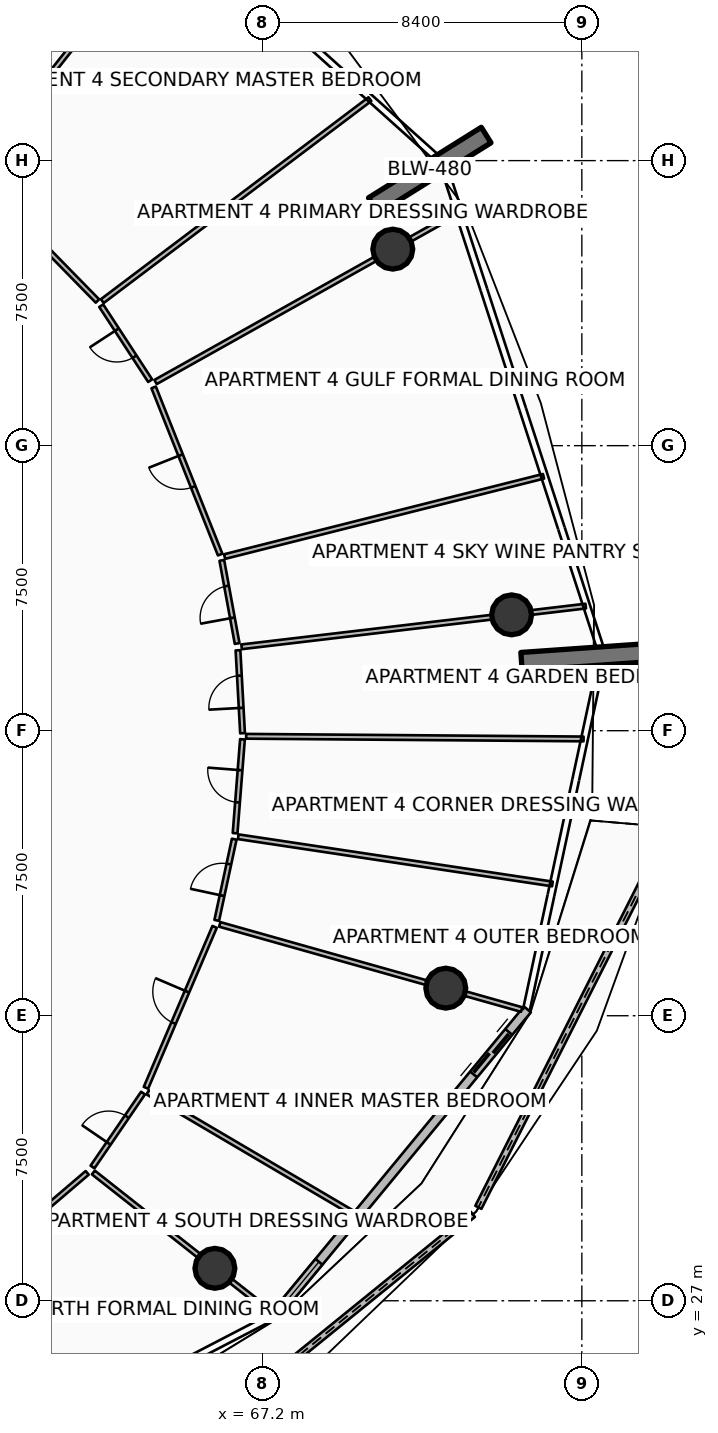
"""IFC4 building model, lengths in metres.
Left out: names, types, materials, properties, quantities, classifications, styles, units other than length and angle.
Written with IfcOpenShell. Run it as: python <this file> out.ifc"""

import sys

from ifc_helpers import new_model, si_unit, direction, frame, frame_2d, origin, origin_2d, place, context, subcontext, project, spatial, polyline, rectangle, circle, outline, extrude, element, fill, save


model = new_model("IFC4")
c1 = context("Model", 3, precision=1e-05, world=origin(), true_north=direction((0.0, 1.0)))
c2 = subcontext(c1, "Body", "Model", "MODEL_VIEW")
j1 = project(units=[si_unit("LENGTHUNIT", "METRE"), si_unit("PLANEANGLEUNIT", "RADIAN")], contexts=[c1])
p1 = place(None, origin())
s1 = spatial("IfcSite", under=j1, at=p1, CompositionType="ELEMENT")
p2 = place(p1, origin())
s2 = spatial("IfcBuilding", under=s1, at=p2, CompositionType="ELEMENT")
p3 = place(p2, frame((0.0, 0.0, 202.8)))
s3 = spatial("IfcBuildingStorey", under=s2, at=p3, CompositionType="ELEMENT", Elevation=202.8)
p4 = place(p3, frame((70.114, 55.818, 0.0), z_axis=(0.0, 0.0, 1.0), x_axis=(0.848033572426, 0.529942506352, 0.0)))
e1 = element("IfcWall", 1, at=p4, inside=s3, PredefinedType="SOLIDWALL", context=c2, shape_type="SweptSolid", body=[
    extrude(rectangle(XDim=3.5, YDim=0.48, at=frame_2d((1.75, 0.0))), origin(), (0.0, 0.0, 1.0), 3.75),
])
p5 = place(p3, frame((74.013, 43.819, 0.0), z_axis=(0.0, 0.0, 1.0), x_axis=(0.997568676264, 0.069690287244, 0.0)))
e2 = element("IfcWall", 2, at=p5, inside=s3, PredefinedType="SOLIDWALL", context=c2, shape_type="SweptSolid", body=[
    extrude(rectangle(XDim=3.5, YDim=0.48, at=frame_2d((1.75, 0.0))), origin(), (0.0, 0.0, 1.0), 3.75),
])
for number, where, z_axis, x_axis in (
    (3, (70.625, 54.671, 0.0), (0.0, 0.0, 1.0), (1.0, 0.0, 0.0)),
    (4, (65.944, 27.854, 0.0), (0.0, 0.0, 1.0), (1.0, 0.0, 0.0)),
    (5, (72.02, 35.226, 0.0), (0.0, 0.0, 1.0), (1.0, 0.0, 0.0)),
    (6, (73.752, 45.048, 0.0), (0.0, 0.0, 1.0), (1.0, 0.0, 0.0)),
):
    element("IfcColumn", number, at=place(p3, frame(where, z_axis=z_axis, x_axis=x_axis)), inside=s3, PredefinedType="COLUMN", context=c2, shape_type="SweptSolid", body=[
        extrude(circle(Radius=0.525, at=origin_2d()), origin(), (0.0, 0.0, 1.0), 3.5),
    ])
p6 = place(p3, frame((64.663, 22.729, 0.0), z_axis=(0.0, 0.0, 1.0), x_axis=(0.776456761235, 0.630170530834, 0.0)))
e7 = element("IfcWall", 7, at=p6, inside=s3, PredefinedType="PARAPET", context=c2, shape_type="SweptSolid", body=[
    extrude(outline(polyline([(0.0, 0.0), (10.389, 0.0), (10.389, 1.148), (5.195, 1.127), (0.0, 1.224), (0.0, 0.0)])), frame((0.0, 0.09, 0.0), z_axis=(0.0, -1.0, 0.0), x_axis=(1.0, 0.0, 0.0)), (0.0, 0.0, 1.0), 0.18),
])
p7 = place(p3, frame((72.877, 29.459, 0.0), z_axis=(0.0, 0.0, 1.0), x_axis=(0.451373731974, 0.892335001042, 0.0)))
e8 = element("IfcWall", 8, at=p7, inside=s3, PredefinedType="PARAPET", context=c2, shape_type="SweptSolid", body=[
    extrude(outline(polyline([(0.0, 0.0), (11.208, 0.0), (11.208, 1.483), (5.604, 1.284), (0.0, 1.148), (0.0, 0.0)])), frame((0.0, 0.09, 0.0), z_axis=(0.0, -1.0, 0.0), x_axis=(1.0, 0.0, 0.0)), (0.0, 0.0, 1.0), 0.18),
])
p8 = place(p3, frame((67.485, 26.576, 0.0), z_axis=(0.0, 0.0, 1.0), x_axis=(0.636759394418, 0.771062561418, 0.0)))
e9 = element("IfcWall", 9, at=p8, inside=s3, PredefinedType="SOLIDWALL", context=c2, shape_type="SweptSolid", body=[
    extrude(rectangle(XDim=10.494, YDim=0.24, at=frame_2d((5.247, 0.0))), origin(), (0.0, 0.0, 1.0), 2.45),
])
p9 = place(p8, frame((8.274, 0.0, 0.0)))
e10 = element("IfcOpeningElement", 10, at=p9, cuts=e9, PredefinedType="OPENING", context=c2, shape_type="SweptSolid", body=[
    extrude(rectangle(XDim=1.45, YDim=2.15, at=frame_2d((0.725, 1.075))), frame((0.0, 0.13, 0.0), z_axis=(0.0, -1.0, 0.0), x_axis=(1.0, 0.0, 0.0)), (0.0, 0.0, 1.0), 0.26),
])
p10 = place(p8, frame((0.28, 0.0, 0.65)))
e11 = element("IfcOpeningElement", 11, at=p10, cuts=e9, PredefinedType="OPENING", context=c2, shape_type="SweptSolid", body=[
    extrude(rectangle(XDim=1.6, YDim=1.5, at=frame_2d((0.8, 0.75))), frame((0.0, 0.13, 0.0), z_axis=(0.0, -1.0, 0.0), x_axis=(1.0, 0.0, 0.0)), (0.0, 0.0, 1.0), 0.26),
])
p11 = place(p3, frame((57.21, 25.776, 0.0), z_axis=(0.0, 0.0, 1.0), x_axis=(0.760406375863, 0.649447567973, 0.0)))
e12 = element("IfcWall", 12, at=p11, inside=s3, PredefinedType="PARTITIONING", context=c2, shape_type="SweptSolid", body=[
    extrude(rectangle(XDim=7.067, YDim=0.125, at=frame_2d((3.534, 0.0))), origin(), (0.0, 0.0, 1.0), 2.94),
])
p12 = place(p11, frame((3.084, 0.0, 0.0)))
e13 = element("IfcOpeningElement", 13, at=p12, cuts=e12, PredefinedType="OPENING", context=c2, shape_type="SweptSolid", body=[
    extrude(rectangle(XDim=0.9, YDim=2.08, at=frame_2d((0.45, 1.04))), frame((0.0, 0.073, 0.0), z_axis=(0.0, -1.0, 0.0), x_axis=(1.0, 0.0, 0.0)), (0.0, 0.0, 1.0), 0.145),
])
p13 = place(p3, frame((62.746, 30.375, 0.0), z_axis=(0.0, 0.0, 1.0), x_axis=(0.785328774221, -0.619078925809, 0.0)))
e14 = element("IfcWall", 14, at=p13, inside=s3, PredefinedType="PARTITIONING", context=c2, shape_type="SweptSolid", body=[
    extrude(rectangle(XDim=6.05, YDim=0.125, at=frame_2d((3.025, 0.0))), origin(), (0.0, 0.0, 1.0), 2.94),
])
p14 = place(p3, frame((64.176, 32.485, 0.0), z_axis=(0.0, 0.0, 1.0), x_axis=(0.861934215158, -0.507020126563, 0.0)))
e15 = element("IfcWall", 15, at=p14, inside=s3, PredefinedType="PARTITIONING", context=c2, shape_type="SweptSolid", body=[
    extrude(rectangle(XDim=6.269, YDim=0.125, at=frame_2d((3.135, 0.0))), origin(), (0.0, 0.0, 1.0), 2.94),
])
p15 = place(p3, frame((62.724, 30.52, 0.0), z_axis=(0.0, 0.0, 1.0), x_axis=(0.564301181705, 0.825569001554, 0.0)))
e16 = element("IfcWall", 16, at=p15, inside=s3, PredefinedType="PARTITIONING", context=c2, shape_type="SweptSolid", body=[
    extrude(rectangle(XDim=2.356, YDim=0.125, at=frame_2d((1.178, 0.0))), origin(), (0.0, 0.0, 1.0), 2.94),
])
p16 = place(p15, frame((0.753, 0.0, 0.0)))
e17 = element("IfcOpeningElement", 17, at=p16, cuts=e16, PredefinedType="OPENING", context=c2, shape_type="SweptSolid", body=[
    extrude(rectangle(XDim=0.85, YDim=2.06, at=frame_2d((0.425, 1.03))), frame((0.0, 0.073, 0.0), z_axis=(0.0, -1.0, 0.0), x_axis=(1.0, 0.0, 0.0)), (0.0, 0.0, 1.0), 0.145),
])
p17 = place(p3, frame((64.13, 32.604, 0.0), z_axis=(0.0, 0.0, 1.0), x_axis=(0.392433899516, 0.919780209893, 0.0)))
e18 = element("IfcWall", 18, at=p17, inside=s3, PredefinedType="PARTITIONING", context=c2, shape_type="SweptSolid", body=[
    extrude(rectangle(XDim=4.604, YDim=0.125, at=frame_2d((2.302, 0.0))), origin(), (0.0, 0.0, 1.0), 2.94),
])
p18 = place(p17, frame((1.852, 0.0, 0.0)))
e19 = element("IfcOpeningElement", 19, at=p18, cuts=e18, PredefinedType="OPENING", context=c2, shape_type="SweptSolid", body=[
    extrude(rectangle(XDim=0.9, YDim=2.08, at=frame_2d((0.45, 1.04))), frame((0.0, 0.073, 0.0), z_axis=(0.0, -1.0, 0.0), x_axis=(1.0, 0.0, 0.0)), (0.0, 0.0, 1.0), 0.145),
])
p19 = place(p3, frame((66.072, 36.903, 0.0), z_axis=(0.0, 0.0, 1.0), x_axis=(0.9624482888, -0.271465083179, 0.0)))
e20 = element("IfcWall", 20, at=p19, inside=s3, PredefinedType="PARTITIONING", context=c2, shape_type="SweptSolid", body=[
    extrude(rectangle(XDim=8.253, YDim=0.125, at=frame_2d((4.126, 0.0))), origin(), (0.0, 0.0, 1.0), 2.94),
])
p20 = place(p3, frame((66.558, 39.21, 0.0), z_axis=(0.0, 0.0, 1.0), x_axis=(0.988887463127, -0.148666019217, 0.0)))
e21 = element("IfcWall", 21, at=p20, inside=s3, PredefinedType="PARTITIONING", context=c2, shape_type="SweptSolid", body=[
    extrude(rectangle(XDim=8.361, YDim=0.125, at=frame_2d((4.18, 0.0))), origin(), (0.0, 0.0, 1.0), 2.94),
])
p21 = place(p3, frame((66.766, 41.853, 0.0), z_axis=(0.0, 0.0, 1.0), x_axis=(0.999969292204, -0.007836749939, 0.0)))
e22 = element("IfcWall", 22, at=p21, inside=s3, PredefinedType="PARTITIONING", context=c2, shape_type="SweptSolid", body=[
    extrude(rectangle(XDim=8.879, YDim=0.125, at=frame_2d((4.439, 0.0))), origin(), (0.0, 0.0, 1.0), 2.94),
])
p22 = place(p3, frame((65.993, 37.009, 0.0), z_axis=(0.0, 0.0, 1.0), x_axis=(0.210467381842, 0.977600880309, 0.0)))
e23 = element("IfcWall", 23, at=p22, inside=s3, PredefinedType="PARTITIONING", context=c2, shape_type="SweptSolid", body=[
    extrude(rectangle(XDim=2.186, YDim=0.125, at=frame_2d((1.093, 0.0))), origin(), (0.0, 0.0, 1.0), 2.94),
])
p23 = place(p22, frame((0.668, 0.0, 0.0)))
e24 = element("IfcOpeningElement", 24, at=p23, cuts=e23, PredefinedType="OPENING", context=c2, shape_type="SweptSolid", body=[
    extrude(rectangle(XDim=0.85, YDim=2.06, at=frame_2d((0.425, 1.03))), frame((0.0, 0.073, 0.0), z_axis=(0.0, -1.0, 0.0), x_axis=(1.0, 0.0, 0.0)), (0.0, 0.0, 1.0), 0.145),
])
p24 = place(p3, frame((66.476, 39.303, 0.0), z_axis=(0.0, 0.0, 1.0), x_axis=(0.078519549514, 0.996912574073, 0.0)))
e25 = element("IfcWall", 25, at=p24, inside=s3, PredefinedType="PARTITIONING", context=c2, shape_type="SweptSolid", body=[
    extrude(rectangle(XDim=2.478, YDim=0.125, at=frame_2d((1.239, 0.0))), origin(), (0.0, 0.0, 1.0), 2.94),
])
p25 = place(p24, frame((0.814, 0.0, 0.0)))
e26 = element("IfcOpeningElement", 26, at=p25, cuts=e25, PredefinedType="OPENING", context=c2, shape_type="SweptSolid", body=[
    extrude(rectangle(XDim=0.85, YDim=2.06, at=frame_2d((0.425, 1.03))), frame((0.0, 0.073, 0.0), z_axis=(0.0, -1.0, 0.0), x_axis=(1.0, 0.0, 0.0)), (0.0, 0.0, 1.0), 0.145),
])
p26 = place(p3, frame((66.672, 41.933, 0.0), z_axis=(0.0, 0.0, 1.0), x_axis=(-0.054962664786, 0.998488410288, 0.0)))
e27 = element("IfcWall", 27, at=p26, inside=s3, PredefinedType="PARTITIONING", context=c2, shape_type="SweptSolid", body=[
    extrude(rectangle(XDim=2.186, YDim=0.125, at=frame_2d((1.093, 0.0))), origin(), (0.0, 0.0, 1.0), 2.94),
])
p27 = place(p26, frame((0.668, 0.0, 0.0)))
e28 = element("IfcOpeningElement", 28, at=p27, cuts=e27, PredefinedType="OPENING", context=c2, shape_type="SweptSolid", body=[
    extrude(rectangle(XDim=0.85, YDim=2.06, at=frame_2d((0.425, 1.03))), frame((0.0, 0.073, 0.0), z_axis=(0.0, -1.0, 0.0), x_axis=(1.0, 0.0, 0.0)), (0.0, 0.0, 1.0), 0.145),
])
p28 = place(p3, frame((66.647, 44.207, 0.0), z_axis=(0.0, 0.0, 1.0), x_axis=(0.993068115644, 0.117540281145, 0.0)))
e29 = element("IfcWall", 29, at=p28, inside=s3, PredefinedType="PARTITIONING", context=c2, shape_type="SweptSolid", body=[
    extrude(rectangle(XDim=9.118, YDim=0.125, at=frame_2d((4.559, 0.0))), origin(), (0.0, 0.0, 1.0), 2.94),
])
p29 = place(p3, frame((66.199, 46.582, 0.0), z_axis=(0.0, 0.0, 1.0), x_axis=(0.969747932206, 0.244108475851, 0.0)))
e30 = element("IfcWall", 30, at=p29, inside=s3, PredefinedType="PARTITIONING", context=c2, shape_type="SweptSolid", body=[
    extrude(rectangle(XDim=8.654, YDim=0.125, at=frame_2d((4.327, 0.0))), origin(), (0.0, 0.0, 1.0), 2.94),
])
p30 = place(p3, frame((66.529, 44.293, 0.0), z_axis=(0.0, 0.0, 1.0), x_axis=(-0.181126107814, 0.983459878728, 0.0)))
e31 = element("IfcWall", 31, at=p30, inside=s3, PredefinedType="PARTITIONING", context=c2, shape_type="SweptSolid", body=[
    extrude(rectangle(XDim=2.224, YDim=0.125, at=frame_2d((1.112, 0.0))), origin(), (0.0, 0.0, 1.0), 2.94),
])
p31 = place(p30, frame((0.687, 0.0, 0.0)))
e32 = element("IfcOpeningElement", 32, at=p31, cuts=e31, PredefinedType="OPENING", context=c2, shape_type="SweptSolid", body=[
    extrude(rectangle(XDim=0.85, YDim=2.06, at=frame_2d((0.425, 1.03))), frame((0.0, 0.073, 0.0), z_axis=(0.0, -1.0, 0.0), x_axis=(1.0, 0.0, 0.0)), (0.0, 0.0, 1.0), 0.145),
])
p32 = place(p3, frame((66.082, 46.634, 0.0), z_axis=(0.0, 0.0, 1.0), x_axis=(-0.369567399645, 0.929203926552, 0.0)))
e33 = element("IfcWall", 33, at=p32, inside=s3, PredefinedType="PARTITIONING", context=c2, shape_type="SweptSolid", body=[
    extrude(rectangle(XDim=4.735, YDim=0.125, at=frame_2d((2.367, 0.0))), origin(), (0.0, 0.0, 1.0), 2.94),
])
p33 = place(p32, frame((1.917, 0.0, 0.0)))
e34 = element("IfcOpeningElement", 34, at=p33, cuts=e33, PredefinedType="OPENING", context=c2, shape_type="SweptSolid", body=[
    extrude(rectangle(XDim=0.9, YDim=2.08, at=frame_2d((0.45, 1.04))), frame((0.0, 0.073, 0.0), z_axis=(0.0, -1.0, 0.0), x_axis=(1.0, 0.0, 0.0)), (0.0, 0.0, 1.0), 0.145),
])
p34 = place(p3, frame((64.383, 51.175, 0.0), z_axis=(0.0, 0.0, 1.0), x_axis=(0.872496427588, 0.488620490611, 0.0)))
e35 = element("IfcWall", 35, at=p34, inside=s3, PredefinedType="PARTITIONING", context=c2, shape_type="SweptSolid", body=[
    extrude(rectangle(XDim=9.118, YDim=0.125, at=frame_2d((4.559, 0.0))), origin(), (0.0, 0.0, 1.0), 2.94),
])
p35 = place(p3, frame((59.625, 56.746, 0.0), z_axis=(0.0, 0.0, 1.0), x_axis=(0.619083134383, 0.785325456561, 0.0)))
e36 = element("IfcWall", 36, at=p35, inside=s3, PredefinedType="PARTITIONING", context=c2, shape_type="SweptSolid", body=[
    extrude(rectangle(XDim=8.353, YDim=0.125, at=frame_2d((4.177, 0.0))), origin(), (0.0, 0.0, 1.0), 2.94),
])
p36 = place(p3, frame((62.981, 53.303, 0.0), z_axis=(0.0, 0.0, 1.0), x_axis=(0.798266473747, 0.602304438711, 0.0)))
e37 = element("IfcWall", 37, at=p36, inside=s3, PredefinedType="PARTITIONING", context=c2, shape_type="SweptSolid", body=[
    extrude(rectangle(XDim=8.822, YDim=0.125, at=frame_2d((4.411, 0.0))), origin(), (0.0, 0.0, 1.0), 2.94),
])
p37 = place(p3, frame((64.241, 51.21, 0.0), z_axis=(0.0, 0.0, 1.0), x_axis=(-0.546782970229, 0.837274377649, 0.0)))
e38 = element("IfcWall", 38, at=p37, inside=s3, PredefinedType="PARTITIONING", context=c2, shape_type="SweptSolid", body=[
    extrude(rectangle(XDim=2.356, YDim=0.125, at=frame_2d((1.178, 0.0))), origin(), (0.0, 0.0, 1.0), 2.94),
])
p38 = place(p37, frame((0.753, 0.0, 0.0)))
e39 = element("IfcOpeningElement", 39, at=p38, cuts=e38, PredefinedType="OPENING", context=c2, shape_type="SweptSolid", body=[
    extrude(rectangle(XDim=0.85, YDim=2.06, at=frame_2d((0.425, 1.03))), frame((0.0, 0.073, 0.0), z_axis=(0.0, -1.0, 0.0), x_axis=(1.0, 0.0, 0.0)), (0.0, 0.0, 1.0), 0.145),
])
p39 = place(p3, frame((62.853, 53.306, 0.0), z_axis=(0.0, 0.0, 1.0), x_axis=(-0.699562743434, 0.714571177699, 0.0)))
e40 = element("IfcWall", 40, at=p39, inside=s3, PredefinedType="PARTITIONING", context=c2, shape_type="SweptSolid", body=[
    extrude(rectangle(XDim=4.604, YDim=0.125, at=frame_2d((2.302, 0.0))), origin(), (0.0, 0.0, 1.0), 2.94),
])
p40 = place(p39, frame((1.852, 0.0, 0.0)))
e41 = element("IfcOpeningElement", 41, at=p40, cuts=e40, PredefinedType="OPENING", context=c2, shape_type="SweptSolid", body=[
    extrude(rectangle(XDim=0.9, YDim=2.08, at=frame_2d((0.45, 1.04))), frame((0.0, 0.073, 0.0), z_axis=(0.0, -1.0, 0.0), x_axis=(1.0, 0.0, 0.0)), (0.0, 0.0, 1.0), 0.145),
])
p41 = place(p9, origin())
e42 = element("IfcDoor", 42, at=p41, inside=s3, OperationType="DOUBLE_DOOR_SLIDING", PredefinedType="DOOR", context=c2, shape_type="SweptSolid", body=[
    extrude(rectangle(XDim=1.45, YDim=2.15, at=frame_2d((0.725, 1.075))), frame((0.0, 0.025, 0.0), z_axis=(0.0, -1.0, 0.0), x_axis=(1.0, 0.0, 0.0)), (0.0, 0.0, 1.0), 0.05),
])
fill(e10, e42)
p42 = place(p10, origin())
e43 = element("IfcWindow", 43, at=p42, inside=s3, PartitioningType="SINGLE_PANEL", PredefinedType="WINDOW", context=c2, shape_type="SweptSolid", body=[
    extrude(rectangle(XDim=1.6, YDim=1.5, at=frame_2d((0.8, 0.75))), frame((0.0, 0.03, 0.0), z_axis=(0.0, -1.0, 0.0), x_axis=(1.0, 0.0, 0.0)), (0.0, 0.0, 1.0), 0.06),
])
fill(e11, e43)
p43 = place(p16, origin())
e44 = element("IfcDoor", 44, at=p43, inside=s3, OperationType="SINGLE_SWING_LEFT", PredefinedType="DOOR", context=c2, shape_type="SweptSolid", body=[
    extrude(rectangle(XDim=0.85, YDim=2.06, at=frame_2d((0.425, 1.03))), frame((0.0, 0.025, 0.0), z_axis=(0.0, -1.0, 0.0), x_axis=(1.0, 0.0, 0.0)), (0.0, 0.0, 1.0), 0.05),
])
fill(e17, e44)
p44 = place(p18, origin())
e45 = element("IfcDoor", 45, at=p44, inside=s3, OperationType="SINGLE_SWING_RIGHT", PredefinedType="DOOR", context=c2, shape_type="SweptSolid", body=[
    extrude(rectangle(XDim=0.9, YDim=2.08, at=frame_2d((0.45, 1.04))), frame((0.0, 0.025, 0.0), z_axis=(0.0, -1.0, 0.0), x_axis=(1.0, 0.0, 0.0)), (0.0, 0.0, 1.0), 0.05),
])
fill(e19, e45)
p45 = place(p23, origin())
e46 = element("IfcDoor", 46, at=p45, inside=s3, OperationType="SINGLE_SWING_LEFT", PredefinedType="DOOR", context=c2, shape_type="SweptSolid", body=[
    extrude(rectangle(XDim=0.85, YDim=2.06, at=frame_2d((0.425, 1.03))), frame((0.0, 0.025, 0.0), z_axis=(0.0, -1.0, 0.0), x_axis=(1.0, 0.0, 0.0)), (0.0, 0.0, 1.0), 0.05),
])
fill(e24, e46)
p46 = place(p25, origin())
e47 = element("IfcDoor", 47, at=p46, inside=s3, OperationType="SINGLE_SWING_RIGHT", PredefinedType="DOOR", context=c2, shape_type="SweptSolid", body=[
    extrude(rectangle(XDim=0.85, YDim=2.06, at=frame_2d((0.425, 1.03))), frame((0.0, 0.025, 0.0), z_axis=(0.0, -1.0, 0.0), x_axis=(1.0, 0.0, 0.0)), (0.0, 0.0, 1.0), 0.05),
])
fill(e26, e47)
p47 = place(p27, origin())
e48 = element("IfcDoor", 48, at=p47, inside=s3, OperationType="SINGLE_SWING_LEFT", PredefinedType="DOOR", context=c2, shape_type="SweptSolid", body=[
    extrude(rectangle(XDim=0.85, YDim=2.06, at=frame_2d((0.425, 1.03))), frame((0.0, 0.025, 0.0), z_axis=(0.0, -1.0, 0.0), x_axis=(1.0, 0.0, 0.0)), (0.0, 0.0, 1.0), 0.05),
])
fill(e28, e48)
p48 = place(p31, origin())
e49 = element("IfcDoor", 49, at=p48, inside=s3, OperationType="SINGLE_SWING_LEFT", PredefinedType="DOOR", context=c2, shape_type="SweptSolid", body=[
    extrude(rectangle(XDim=0.85, YDim=2.06, at=frame_2d((0.425, 1.03))), frame((0.0, 0.025, 0.0), z_axis=(0.0, -1.0, 0.0), x_axis=(1.0, 0.0, 0.0)), (0.0, 0.0, 1.0), 0.05),
])
fill(e32, e49)
p49 = place(p33, origin())
e50 = element("IfcDoor", 50, at=p49, inside=s3, OperationType="SINGLE_SWING_RIGHT", PredefinedType="DOOR", context=c2, shape_type="SweptSolid", body=[
    extrude(rectangle(XDim=0.9, YDim=2.08, at=frame_2d((0.45, 1.04))), frame((0.0, 0.025, 0.0), z_axis=(0.0, -1.0, 0.0), x_axis=(1.0, 0.0, 0.0)), (0.0, 0.0, 1.0), 0.05),
])
fill(e34, e50)
p50 = place(p38, origin())
e51 = element("IfcDoor", 51, at=p50, inside=s3, OperationType="SINGLE_SWING_RIGHT", PredefinedType="DOOR", context=c2, shape_type="SweptSolid", body=[
    extrude(rectangle(XDim=0.85, YDim=2.06, at=frame_2d((0.425, 1.03))), frame((0.0, 0.025, 0.0), z_axis=(0.0, -1.0, 0.0), x_axis=(1.0, 0.0, 0.0)), (0.0, 0.0, 1.0), 0.05),
])
fill(e39, e51)
save(model, sys.argv[1])
